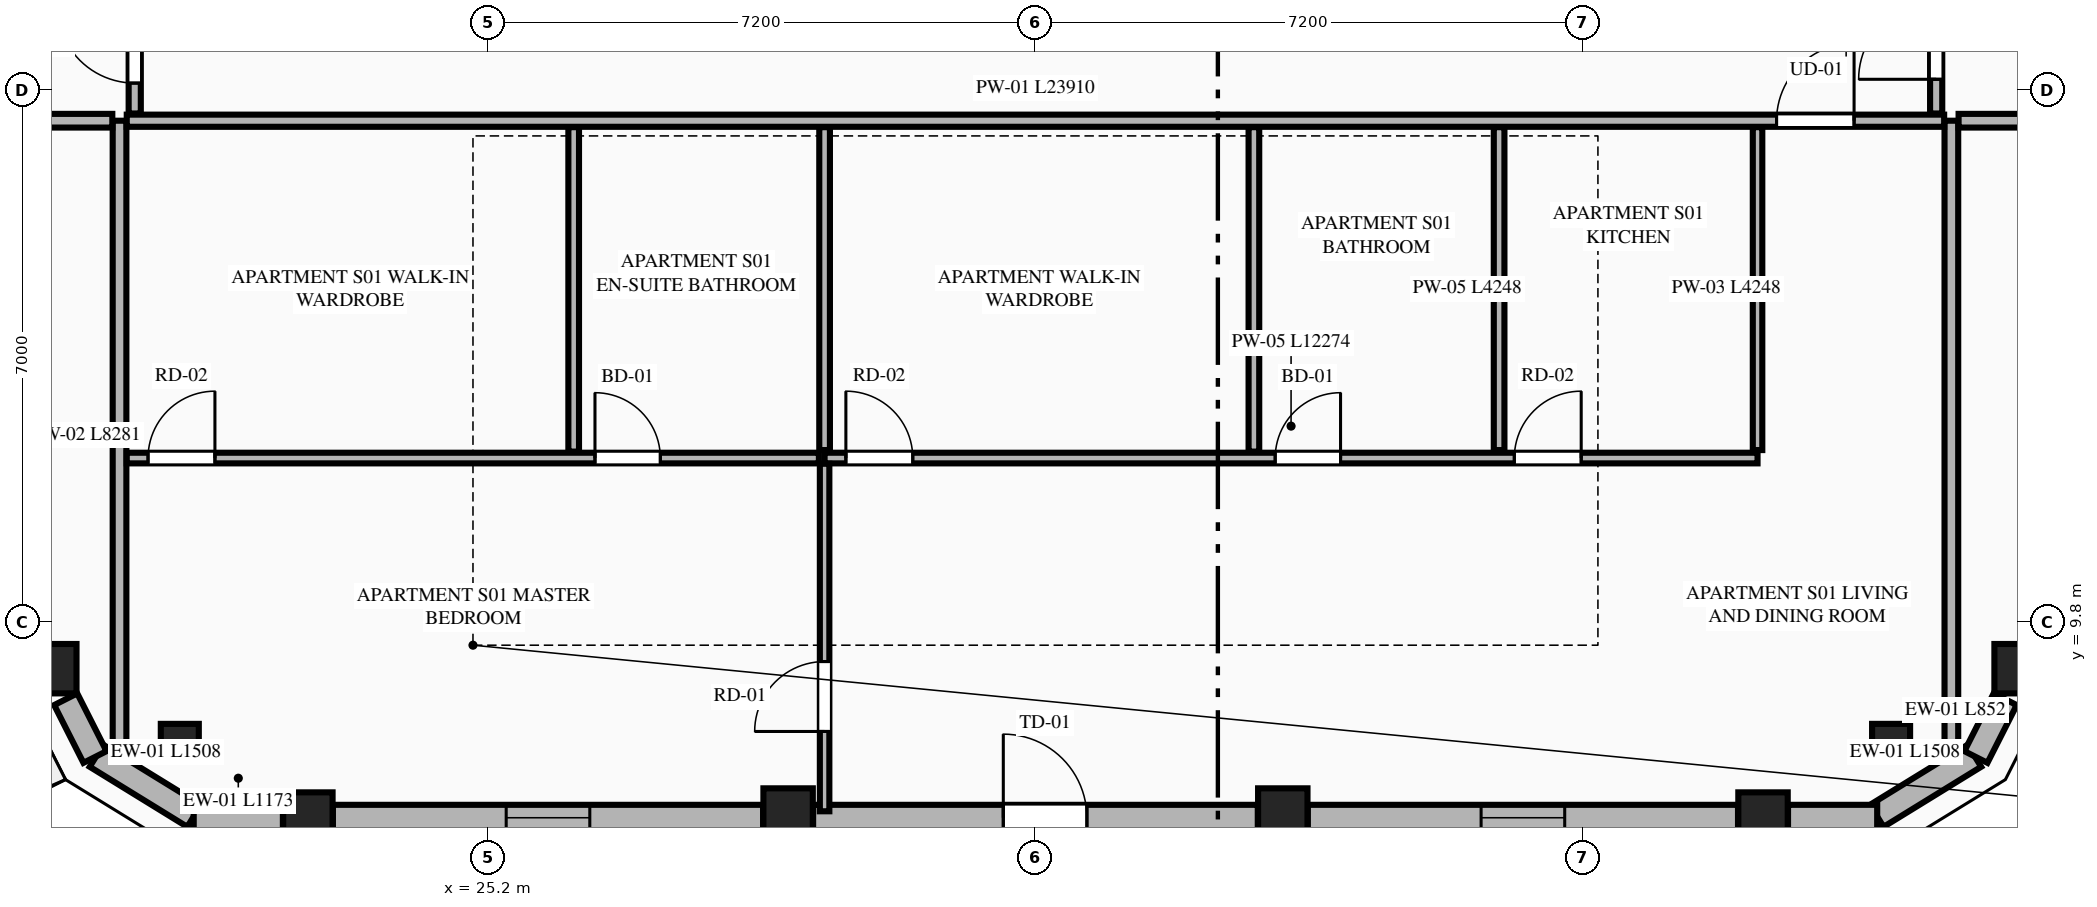
"""IFC4 building model, lengths in metres.
Left out: names, types, materials, properties, quantities, classifications, styles, units other than length and angle.
Written with IfcOpenShell. Run it as: python <this file> out.ifc"""

import sys

from ifc_helpers import new_model, si_unit, direction, frame, frame_2d, origin, origin_2d, place, context, subcontext, project, spatial, rectangle, extrude, element, fill, save


model = new_model("IFC4")
c1 = context("Model", 3, precision=1e-05, world=origin(), true_north=direction((0.0, 1.0)))
c2 = subcontext(c1, "Body", "Model", "MODEL_VIEW")
j1 = project(units=[si_unit("LENGTHUNIT", "METRE"), si_unit("PLANEANGLEUNIT", "RADIAN")], contexts=[c1])
p1 = place(None, origin())
s1 = spatial("IfcSite", under=j1, at=p1, CompositionType="ELEMENT")
p2 = place(p1, origin())
s2 = spatial("IfcBuilding", under=s1, at=p2, CompositionType="ELEMENT")
p3 = place(p2, frame((0.0, 0.0, 287.5)))
s3 = spatial("IfcBuildingStorey", under=s2, at=p3, CompositionType="ELEMENT", Elevation=287.5)
for number, where, z_axis, x_axis in (
    (1, (22.828, 7.239, 0.0), (0.0, 0.0, 1.0), (1.0, 0.0, 0.0)),
    (2, (29.146, 7.292, 0.0), (0.0, 0.0, 1.0), (1.0, 0.0, 0.0)),
    (3, (35.654, 7.292, 0.0), (0.0, 0.0, 1.0), (1.0, 0.0, 0.0)),
    (4, (41.972, 7.239, 0.0), (0.0, 0.0, 1.0), (1.0, 0.0, 0.0)),
    (5, (45.341, 9.191, 0.0), (0.0, 0.0, 1.0), (1.0, 0.0, 0.0)),
    (6, (19.459, 9.191, 0.0), (0.0, 0.0, 1.0), (1.0, 0.0, 0.0)),
):
    element("IfcColumn", number, at=place(p3, frame(where, z_axis=z_axis, x_axis=x_axis)), inside=s3, PredefinedType="COLUMN", context=c2, shape_type="SweptSolid", body=[
        extrude(rectangle(XDim=0.65, YDim=0.65, at=origin_2d()), origin(), (0.0, 0.0, 1.0), 4.0),
    ])
for number, where, z_axis, x_axis in (
    (7, (21.143, 8.215, 0.0), (0.0, 0.0, 1.0), (0.865, -0.501, 0.0)),
    (8, (43.657, 8.215, 0.0), (0.0, 0.0, 1.0), (0.865, 0.501, 0.0)),
):
    element("IfcColumn", number, at=place(p3, frame(where, z_axis=z_axis, x_axis=x_axis)), inside=s3, PredefinedType="PILASTER", context=c2, shape_type="SweptSolid", body=[
        extrude(rectangle(XDim=0.5, YDim=0.35, at=origin_2d()), origin(), (0.0, 0.0, 1.0), 4.0),
    ])
for number, where, z_axis, x_axis in (
    (9, (20.047, 8.045, 0.0), (0.0, 0.0, 1.0), (0.852, -0.524, 0.0)),
    (10, (43.469, 7.255, 0.0), (0.0, 0.0, 1.0), (0.852, 0.524, 0.0)),
):
    element("IfcWall", number, at=place(p3, frame(where, z_axis=z_axis, x_axis=x_axis)), inside=s3, PredefinedType="STANDARD", context=c2, shape_type="SweptSolid", body=[
        extrude(rectangle(XDim=1.508, YDim=0.34, at=frame_2d((0.754, 0.0))), origin(), (0.0, 0.0, 1.0), 3.8),
    ])
p4 = place(p3, frame((21.326, 7.23, 0.0), z_axis=(0.0, 0.0, 1.0), x_axis=(1.0, 0.0, 0.0)))
e11 = element("IfcWall", 11, at=p4, inside=s3, PredefinedType="STANDARD", context=c2, shape_type="SweptSolid", body=[
    extrude(rectangle(XDim=1.173, YDim=0.34, at=frame_2d((0.586, 0.0))), origin(), (0.0, 0.0, 1.0), 3.8),
])
p5 = place(p3, frame((23.157, 7.23, 0.0), z_axis=(0.0, 0.0, 1.0), x_axis=(1.0, 0.0, 0.0)))
e12 = element("IfcWall", 12, at=p5, inside=s3, PredefinedType="STANDARD", context=c2, shape_type="SweptSolid", body=[
    extrude(rectangle(XDim=5.66, YDim=0.34, at=frame_2d((2.83, 0.0))), origin(), (0.0, 0.0, 1.0), 2.99),
])
p6 = place(p5, frame((2.28, 0.0, 0.75)))
e13 = element("IfcOpeningElement", 13, at=p6, cuts=e12, PredefinedType="OPENING", context=c2, shape_type="SweptSolid", body=[
    extrude(rectangle(XDim=1.1, YDim=2.0, at=frame_2d((0.55, 1.0))), frame((0.0, 0.18, 0.0), z_axis=(0.0, -1.0, 0.0), x_axis=(1.0, 0.0, 0.0)), (0.0, 0.0, 1.0), 0.36),
])
p7 = place(p3, frame((29.475, 7.23, 0.0), z_axis=(0.0, 0.0, 1.0), x_axis=(1.0, 0.0, 0.0)))
e14 = element("IfcWall", 14, at=p7, inside=s3, PredefinedType="STANDARD", context=c2, shape_type="SweptSolid", body=[
    extrude(rectangle(XDim=5.85, YDim=0.34, at=frame_2d((2.925, 0.0))), origin(), (0.0, 0.0, 1.0), 2.99),
])
p8 = place(p7, frame((2.502, 0.0, 0.0)))
e15 = element("IfcOpeningElement", 15, at=p8, cuts=e14, PredefinedType="OPENING", context=c2, shape_type="SweptSolid", body=[
    extrude(rectangle(XDim=1.1, YDim=2.25, at=frame_2d((0.55, 1.125))), frame((0.0, 0.18, 0.0), z_axis=(0.0, -1.0, 0.0), x_axis=(1.0, 0.0, 0.0)), (0.0, 0.0, 1.0), 0.36),
])
p9 = place(p3, frame((35.983, 7.23, 0.0), z_axis=(0.0, 0.0, 1.0), x_axis=(1.0, 0.0, 0.0)))
e16 = element("IfcWall", 16, at=p9, inside=s3, PredefinedType="STANDARD", context=c2, shape_type="SweptSolid", body=[
    extrude(rectangle(XDim=5.66, YDim=0.34, at=frame_2d((2.83, 0.0))), origin(), (0.0, 0.0, 1.0), 2.99),
])
p10 = place(p9, frame((2.28, 0.0, 0.75)))
e17 = element("IfcOpeningElement", 17, at=p10, cuts=e16, PredefinedType="OPENING", context=c2, shape_type="SweptSolid", body=[
    extrude(rectangle(XDim=1.1, YDim=2.0, at=frame_2d((0.55, 1.0))), frame((0.0, 0.18, 0.0), z_axis=(0.0, -1.0, 0.0), x_axis=(1.0, 0.0, 0.0)), (0.0, 0.0, 1.0), 0.36),
])
p11 = place(p3, frame((42.301, 7.23, 0.0), z_axis=(0.0, 0.0, 1.0), x_axis=(1.0, 0.0, 0.0)))
e18 = element("IfcWall", 18, at=p11, inside=s3, PredefinedType="STANDARD", context=c2, shape_type="SweptSolid", body=[
    extrude(rectangle(XDim=1.173, YDim=0.34, at=frame_2d((0.586, 0.0))), origin(), (0.0, 0.0, 1.0), 3.8),
])
for number, where, z_axis, x_axis in (
    (19, (44.773, 8.029, 0.0), (0.0, 0.0, 1.0), (0.452, 0.892, 0.0)),
    (20, (19.642, 8.789, 0.0), (0.0, 0.0, 1.0), (0.452, -0.892, 0.0)),
):
    element("IfcWall", number, at=place(p3, frame(where, z_axis=z_axis, x_axis=x_axis)), inside=s3, PredefinedType="STANDARD", context=c2, shape_type="SweptSolid", body=[
        extrude(rectangle(XDim=0.852, YDim=0.34, at=frame_2d((0.426, 0.0))), origin(), (0.0, 0.0, 1.0), 3.8),
    ])
for number, where, z_axis, x_axis in (
    (21, (20.35, 8.119, 0.0), (0.0, 0.0, 1.0), (0.0, 1.0, 0.0)),
    (22, (44.45, 8.119, 0.0), (0.0, 0.0, 1.0), (0.0, 1.0, 0.0)),
):
    element("IfcWall", number, at=place(p3, frame(where, z_axis=z_axis, x_axis=x_axis)), inside=s3, PredefinedType="PARTITIONING", context=c2, shape_type="SweptSolid", body=[
        extrude(rectangle(XDim=8.281, YDim=0.18, at=frame_2d((4.141, 0.0))), origin(), (0.0, 0.0, 1.0), 3.8),
    ])
p12 = place(p3, frame((20.445, 16.4, 0.0), z_axis=(0.0, 0.0, 1.0), x_axis=(1.0, 0.0, 0.0)))
e23 = element("IfcWall", 23, at=p12, inside=s3, PredefinedType="PARTITIONING", context=c2, shape_type="SweptSolid", body=[
    extrude(rectangle(XDim=23.91, YDim=0.16, at=frame_2d((11.955, 0.0))), origin(), (0.0, 0.0, 1.0), 3.8),
])
p13 = place(p12, frame((21.705, 0.0, 0.0)))
e24 = element("IfcOpeningElement", 24, at=p13, cuts=e23, PredefinedType="OPENING", context=c2, shape_type="SweptSolid", body=[
    extrude(rectangle(XDim=1.02, YDim=2.25, at=frame_2d((0.51, 1.125))), frame((0.0, 0.09, 0.0), z_axis=(0.0, -1.0, 0.0), x_axis=(1.0, 0.0, 0.0)), (0.0, 0.0, 1.0), 0.18),
])
p14 = place(p3, frame((41.9, 12.067, 0.0), z_axis=(0.0, 0.0, 1.0), x_axis=(0.0, 1.0, 0.0)))
e25 = element("IfcWall", 25, at=p14, inside=s3, PredefinedType="PARTITIONING", context=c2, shape_type="SweptSolid", body=[
    extrude(rectangle(XDim=4.248, YDim=0.125, at=frame_2d((2.124, 0.0))), origin(), (0.0, 0.0, 1.0), 3.257),
])
p15 = place(p3, frame((29.626, 11.962, 0.0), z_axis=(0.0, 0.0, 1.0), x_axis=(1.0, 0.0, 0.0)))
e26 = element("IfcWall", 26, at=p15, inside=s3, PredefinedType="PLUMBINGWALL", context=c2, shape_type="SweptSolid", body=[
    extrude(rectangle(XDim=12.274, YDim=0.14, at=frame_2d((6.137, 0.0))), origin(), (0.0, 0.0, 1.0), 3.8),
])
p16 = place(p15, frame((0.28, 0.0, 0.0)))
e27 = element("IfcOpeningElement", 27, at=p16, cuts=e26, PredefinedType="OPENING", context=c2, shape_type="SweptSolid", body=[
    extrude(rectangle(XDim=0.88, YDim=2.15, at=frame_2d((0.44, 1.075))), frame((0.0, 0.08, 0.0), z_axis=(0.0, -1.0, 0.0), x_axis=(1.0, 0.0, 0.0)), (0.0, 0.0, 1.0), 0.16),
])
p17 = place(p15, frame((5.928, 0.0, 0.0)))
e28 = element("IfcOpeningElement", 28, at=p17, cuts=e26, PredefinedType="OPENING", context=c2, shape_type="SweptSolid", body=[
    extrude(rectangle(XDim=0.86, YDim=2.1, at=frame_2d((0.43, 1.05))), frame((0.0, 0.08, 0.0), z_axis=(0.0, -1.0, 0.0), x_axis=(1.0, 0.0, 0.0)), (0.0, 0.0, 1.0), 0.16),
])
p18 = place(p15, frame((9.074, 0.0, 0.0)))
e29 = element("IfcOpeningElement", 29, at=p18, cuts=e26, PredefinedType="OPENING", context=c2, shape_type="SweptSolid", body=[
    extrude(rectangle(XDim=0.88, YDim=2.15, at=frame_2d((0.44, 1.075))), frame((0.0, 0.08, 0.0), z_axis=(0.0, -1.0, 0.0), x_axis=(1.0, 0.0, 0.0)), (0.0, 0.0, 1.0), 0.16),
])
p19 = place(p3, frame((20.445, 11.962, 0.0), z_axis=(0.0, 0.0, 1.0), x_axis=(1.0, 0.0, 0.0)))
e30 = element("IfcWall", 30, at=p19, inside=s3, PredefinedType="PLUMBINGWALL", context=c2, shape_type="SweptSolid", body=[
    extrude(rectangle(XDim=9.106, YDim=0.14, at=frame_2d((4.553, 0.0))), origin(), (0.0, 0.0, 1.0), 3.8),
])
p20 = place(p19, frame((0.28, 0.0, 0.0)))
e31 = element("IfcOpeningElement", 31, at=p20, cuts=e30, PredefinedType="OPENING", context=c2, shape_type="SweptSolid", body=[
    extrude(rectangle(XDim=0.88, YDim=2.15, at=frame_2d((0.44, 1.075))), frame((0.0, 0.08, 0.0), z_axis=(0.0, -1.0, 0.0), x_axis=(1.0, 0.0, 0.0)), (0.0, 0.0, 1.0), 0.16),
])
p21 = place(p19, frame((6.16, 0.0, 0.0)))
e32 = element("IfcOpeningElement", 32, at=p21, cuts=e30, PredefinedType="OPENING", context=c2, shape_type="SweptSolid", body=[
    extrude(rectangle(XDim=0.86, YDim=2.1, at=frame_2d((0.43, 1.05))), frame((0.0, 0.08, 0.0), z_axis=(0.0, -1.0, 0.0), x_axis=(1.0, 0.0, 0.0)), (0.0, 0.0, 1.0), 0.16),
])
for number, where, z_axis, x_axis in (
    (33, (38.5, 12.067, 0.0), (0.0, 0.0, 1.0), (0.0, 1.0, 0.0)),
    (34, (29.626, 12.067, 0.0), (0.0, 0.0, 1.0), (0.0, 1.0, 0.0)),
):
    element("IfcWall", number, at=place(p3, frame(where, z_axis=z_axis, x_axis=x_axis)), inside=s3, PredefinedType="PLUMBINGWALL", context=c2, shape_type="SweptSolid", body=[
        extrude(rectangle(XDim=4.248, YDim=0.14, at=frame_2d((2.124, 0.0))), origin(), (0.0, 0.0, 1.0), 3.8),
    ])
p22 = place(p3, frame((29.626, 7.315, 0.0), z_axis=(0.0, 0.0, 1.0), x_axis=(0.0, 1.0, 0.0)))
e35 = element("IfcWall", 35, at=p22, inside=s3, PredefinedType="PARTITIONING", context=c2, shape_type="SweptSolid", body=[
    extrude(rectangle(XDim=4.572, YDim=0.125, at=frame_2d((2.286, 0.0))), origin(), (0.0, 0.0, 1.0), 3.8),
])
p23 = place(p22, frame((1.05, 0.0, 0.0)))
e36 = element("IfcOpeningElement", 36, at=p23, cuts=e35, PredefinedType="OPENING", context=c2, shape_type="SweptSolid", body=[
    extrude(rectangle(XDim=0.92, YDim=2.15, at=frame_2d((0.46, 1.075))), frame((0.0, 0.073, 0.0), z_axis=(0.0, -1.0, 0.0), x_axis=(1.0, 0.0, 0.0)), (0.0, 0.0, 1.0), 0.145),
])
for number, where, z_axis, x_axis in (
    (37, (35.274, 12.047, 0.0), (0.0, 0.0, 1.0), (0.0, 1.0, 0.0)),
    (38, (26.325, 12.047, 0.0), (0.0, 0.0, 1.0), (0.0, 1.0, 0.0)),
):
    element("IfcWall", number, at=place(p3, frame(where, z_axis=z_axis, x_axis=x_axis)), inside=s3, PredefinedType="PLUMBINGWALL", context=c2, shape_type="SweptSolid", body=[
        extrude(rectangle(XDim=4.268, YDim=0.14, at=frame_2d((2.134, 0.0))), origin(), (0.0, 0.0, 1.0), 3.8),
    ])
p24 = place(p3, frame((16.034, 16.4, 0.0), z_axis=(0.0, 0.0, 1.0), x_axis=(1.0, 0.0, 0.0)))
e39 = element("IfcWall", 39, at=p24, inside=s3, PredefinedType="PARTITIONING", context=c2, shape_type="SweptSolid", body=[
    extrude(rectangle(XDim=4.221, YDim=0.18, at=frame_2d((2.11, 0.0))), origin(), (0.0, 0.0, 1.0), 3.8),
])
p25 = place(p3, frame((44.545, 16.4, 0.0), z_axis=(0.0, 0.0, 1.0), x_axis=(1.0, 0.0, 0.0)))
e40 = element("IfcWall", 40, at=p25, inside=s3, PredefinedType="PARTITIONING", context=c2, shape_type="SweptSolid", body=[
    extrude(rectangle(XDim=4.221, YDim=0.18, at=frame_2d((2.111, 0.0))), origin(), (0.0, 0.0, 1.0), 3.8),
])
p26 = place(p3, frame((20.55, 16.495, 0.0), z_axis=(0.0, 0.0, 1.0), x_axis=(0.0, 1.0, 0.0)))
e41 = element("IfcWall", 41, at=p26, inside=s3, PredefinedType="PARTITIONING", context=c2, shape_type="SweptSolid", body=[
    extrude(rectangle(XDim=18.41, YDim=0.16, at=frame_2d((9.205, 0.0))), origin(), (0.0, 0.0, 1.0), 3.487),
])
p27 = place(p26, frame((0.4, 0.0, 0.0)))
e42 = element("IfcOpeningElement", 42, at=p27, cuts=e41, PredefinedType="OPENING", context=c2, shape_type="SweptSolid", body=[
    extrude(rectangle(XDim=1.02, YDim=2.25, at=frame_2d((0.51, 1.125))), frame((0.0, 0.09, 0.0), z_axis=(0.0, -1.0, 0.0), x_axis=(1.0, 0.0, 0.0)), (0.0, 0.0, 1.0), 0.18),
])
p28 = place(p3, frame((44.25, 16.495, 0.0), z_axis=(0.0, 0.0, 1.0), x_axis=(0.0, 1.0, 0.0)))
e43 = element("IfcWall", 43, at=p28, inside=s3, PredefinedType="PARTITIONING", context=c2, shape_type="SweptSolid", body=[
    extrude(rectangle(XDim=9.11, YDim=0.16, at=frame_2d((4.555, 0.0))), origin(), (0.0, 0.0, 1.0), 3.487),
])
p29 = place(p28, frame((0.45, 0.0, 0.0)))
e44 = element("IfcOpeningElement", 44, at=p29, cuts=e43, PredefinedType="OPENING", context=c2, shape_type="SweptSolid", body=[
    extrude(rectangle(XDim=1.02, YDim=2.25, at=frame_2d((0.51, 1.125))), frame((0.0, 0.09, 0.0), z_axis=(0.0, -1.0, 0.0), x_axis=(1.0, 0.0, 0.0)), (0.0, 0.0, 1.0), 0.18),
])
p30 = place(p6, origin())
e45 = element("IfcWindow", 45, at=p30, inside=s3, PartitioningType="SINGLE_PANEL", PredefinedType="WINDOW", context=c2, shape_type="SweptSolid", body=[
    extrude(rectangle(XDim=1.1, YDim=2.0, at=frame_2d((0.55, 1.0))), frame((0.0, 0.03, 0.0), z_axis=(0.0, -1.0, 0.0), x_axis=(1.0, 0.0, 0.0)), (0.0, 0.0, 1.0), 0.06),
])
fill(e13, e45)
p31 = place(p8, origin())
e46 = element("IfcDoor", 46, at=p31, inside=s3, OperationType="SINGLE_SWING_LEFT", PredefinedType="DOOR", context=c2, shape_type="SweptSolid", body=[
    extrude(rectangle(XDim=1.1, YDim=2.25, at=frame_2d((0.55, 1.125))), frame((0.0, 0.025, 0.0), z_axis=(0.0, -1.0, 0.0), x_axis=(1.0, 0.0, 0.0)), (0.0, 0.0, 1.0), 0.05),
])
fill(e15, e46)
p32 = place(p10, origin())
e47 = element("IfcWindow", 47, at=p32, inside=s3, PartitioningType="SINGLE_PANEL", PredefinedType="WINDOW", context=c2, shape_type="SweptSolid", body=[
    extrude(rectangle(XDim=1.1, YDim=2.0, at=frame_2d((0.55, 1.0))), frame((0.0, 0.03, 0.0), z_axis=(0.0, -1.0, 0.0), x_axis=(1.0, 0.0, 0.0)), (0.0, 0.0, 1.0), 0.06),
])
fill(e17, e47)
p33 = place(p16, origin())
e48 = element("IfcDoor", 48, at=p33, inside=s3, OperationType="SINGLE_SWING_LEFT", PredefinedType="DOOR", context=c2, shape_type="SweptSolid", body=[
    extrude(rectangle(XDim=0.88, YDim=2.15, at=frame_2d((0.44, 1.075))), frame((0.0, 0.025, 0.0), z_axis=(0.0, -1.0, 0.0), x_axis=(1.0, 0.0, 0.0)), (0.0, 0.0, 1.0), 0.05),
])
fill(e27, e48)
p34 = place(p17, origin())
e49 = element("IfcDoor", 49, at=p34, inside=s3, OperationType="SINGLE_SWING_RIGHT", PredefinedType="DOOR", context=c2, shape_type="SweptSolid", body=[
    extrude(rectangle(XDim=0.86, YDim=2.1, at=frame_2d((0.43, 1.05))), frame((0.0, 0.025, 0.0), z_axis=(0.0, -1.0, 0.0), x_axis=(1.0, 0.0, 0.0)), (0.0, 0.0, 1.0), 0.05),
])
fill(e28, e49)
p35 = place(p20, origin())
e50 = element("IfcDoor", 50, at=p35, inside=s3, OperationType="SINGLE_SWING_RIGHT", PredefinedType="DOOR", context=c2, shape_type="SweptSolid", body=[
    extrude(rectangle(XDim=0.88, YDim=2.15, at=frame_2d((0.44, 1.075))), frame((0.0, 0.025, 0.0), z_axis=(0.0, -1.0, 0.0), x_axis=(1.0, 0.0, 0.0)), (0.0, 0.0, 1.0), 0.05),
])
fill(e31, e50)
p36 = place(p21, origin())
e51 = element("IfcDoor", 51, at=p36, inside=s3, OperationType="SINGLE_SWING_LEFT", PredefinedType="DOOR", context=c2, shape_type="SweptSolid", body=[
    extrude(rectangle(XDim=0.86, YDim=2.1, at=frame_2d((0.43, 1.05))), frame((0.0, 0.025, 0.0), z_axis=(0.0, -1.0, 0.0), x_axis=(1.0, 0.0, 0.0)), (0.0, 0.0, 1.0), 0.05),
])
fill(e32, e51)
p37 = place(p13, origin())
e52 = element("IfcDoor", 52, at=p37, inside=s3, OperationType="SINGLE_SWING_RIGHT", PredefinedType="DOOR", context=c2, shape_type="SweptSolid", body=[
    extrude(rectangle(XDim=1.02, YDim=2.25, at=frame_2d((0.51, 1.125))), frame((0.0, 0.025, 0.0), z_axis=(0.0, -1.0, 0.0), x_axis=(1.0, 0.0, 0.0)), (0.0, 0.0, 1.0), 0.05),
])
fill(e24, e52)
p38 = place(p18, origin())
e53 = element("IfcDoor", 53, at=p38, inside=s3, OperationType="SINGLE_SWING_RIGHT", PredefinedType="DOOR", context=c2, shape_type="SweptSolid", body=[
    extrude(rectangle(XDim=0.88, YDim=2.15, at=frame_2d((0.44, 1.075))), frame((0.0, 0.025, 0.0), z_axis=(0.0, -1.0, 0.0), x_axis=(1.0, 0.0, 0.0)), (0.0, 0.0, 1.0), 0.05),
])
fill(e29, e53)
p39 = place(p23, origin())
e54 = element("IfcDoor", 54, at=p39, inside=s3, OperationType="SINGLE_SWING_LEFT", PredefinedType="DOOR", context=c2, shape_type="SweptSolid", body=[
    extrude(rectangle(XDim=0.92, YDim=2.15, at=frame_2d((0.46, 1.075))), frame((0.0, 0.025, 0.0), z_axis=(0.0, -1.0, 0.0), x_axis=(1.0, 0.0, 0.0)), (0.0, 0.0, 1.0), 0.05),
])
fill(e36, e54)
p40 = place(p27, origin())
e55 = element("IfcDoor", 55, at=p40, inside=s3, OperationType="SINGLE_SWING_RIGHT", PredefinedType="DOOR", context=c2, shape_type="SweptSolid", body=[
    extrude(rectangle(XDim=1.02, YDim=2.25, at=frame_2d((0.51, 1.125))), frame((0.0, 0.025, 0.0), z_axis=(0.0, -1.0, 0.0), x_axis=(1.0, 0.0, 0.0)), (0.0, 0.0, 1.0), 0.05),
])
fill(e42, e55)
p41 = place(p29, origin())
e56 = element("IfcDoor", 56, at=p41, inside=s3, OperationType="SINGLE_SWING_LEFT", PredefinedType="DOOR", context=c2, shape_type="SweptSolid", body=[
    extrude(rectangle(XDim=1.02, YDim=2.25, at=frame_2d((0.51, 1.125))), frame((0.0, 0.025, 0.0), z_axis=(0.0, -1.0, 0.0), x_axis=(1.0, 0.0, 0.0)), (0.0, 0.0, 1.0), 0.05),
])
fill(e44, e56)
save(model, sys.argv[1])
